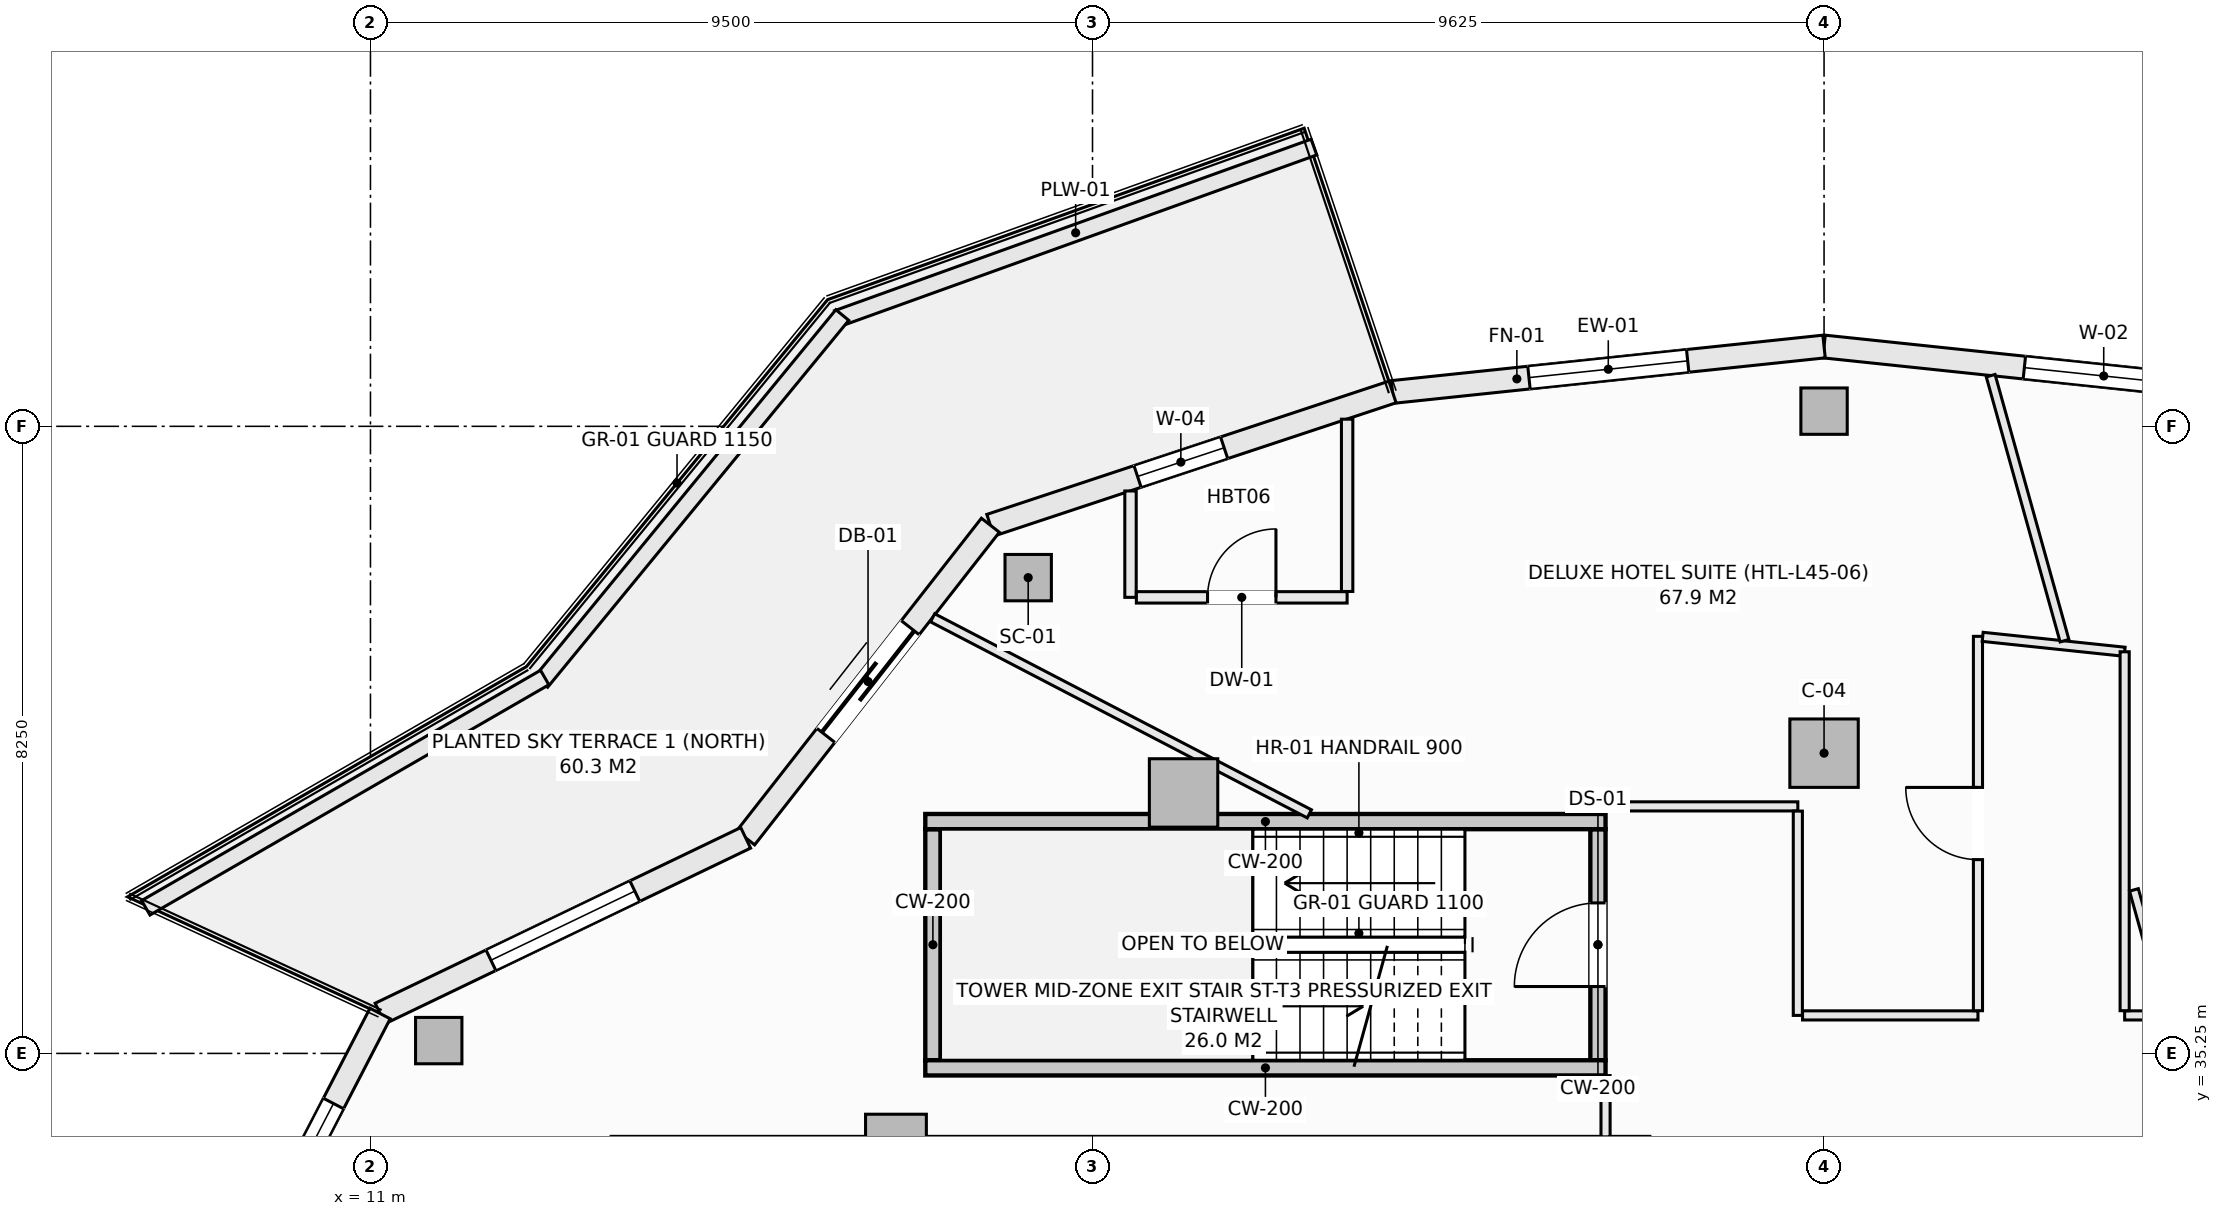
"""IFC4 building model, lengths in metres.
Left out: names, types, materials, properties, quantities, classifications, styles, units other than length and angle.
Written with IfcOpenShell. Run it as: python <this file> out.ifc"""

import sys

from ifc_helpers import new_model, si_unit, direction, frame, frame_2d, origin, origin_2d, place, context, subcontext, project, spatial, rectangle, hollow_rectangle, extrude, element, fill, save


model = new_model("IFC4")
c1 = context("Model", 3, precision=1e-05, world=origin(), true_north=direction((0.0, 1.0)))
c2 = subcontext(c1, "Body", "Model", "MODEL_VIEW")
j1 = project(units=[si_unit("LENGTHUNIT", "METRE"), si_unit("PLANEANGLEUNIT", "RADIAN")], contexts=[c1])
p1 = place(None, origin())
s1 = spatial("IfcSite", under=j1, at=p1, CompositionType="ELEMENT")
p2 = place(p1, origin())
s2 = spatial("IfcBuilding", under=s1, at=p2, CompositionType="ELEMENT")
p3 = place(p2, frame((0.0, 0.0, 173.3)))
s3 = spatial("IfcBuildingStorey", under=s2, at=p3, CompositionType="ELEMENT", Elevation=173.3)
for number, where, z_axis, x_axis in (
    (1, (30.125, 43.7, -0.27), (0.0, 0.0, 1.0), (1.0, 0.0, 0.0)),
    (2, (19.654, 41.51, -0.27), (0.0, 0.0, 1.0), (1.0, 0.0, 0.0)),
    (3, (11.898, 35.419, -0.27), (0.0, 0.0, 1.0), (1.0, 0.0, 0.0)),
):
    element("IfcColumn", number, at=place(p3, frame(where, z_axis=z_axis, x_axis=x_axis)), inside=s3, PredefinedType="COLUMN", context=c2, shape_type="SweptSolid", body=[
        extrude(hollow_rectangle(XDim=0.61, YDim=0.61, WallThickness=0.025, at=origin_2d()), origin(), (0.0, 0.0, 1.0), 3.4),
    ])
for number, where, z_axis, x_axis in (
    (4, (30.125, 39.2, -0.27), (0.0, 0.0, 1.0), (1.0, 0.0, 0.0)),
    (5, (21.698, 38.677, -0.27), (0.0, 0.0, 1.0), (1.0, 0.0, 0.0)),
):
    element("IfcColumn", number, at=place(p3, frame(where, z_axis=z_axis, x_axis=x_axis)), inside=s3, PredefinedType="COLUMN", context=c2, shape_type="SweptSolid", body=[
        extrude(rectangle(XDim=0.9, YDim=0.9, at=origin_2d()), origin(), (0.0, 0.0, 1.0), 3.4),
    ])
p4 = place(p3, frame((17.914, 34.05, -0.27), z_axis=(0.0, 0.0, 1.0), x_axis=(1.0, 0.0, 0.0)))
e6 = element("IfcColumn", 6, at=p4, inside=s3, PredefinedType="PILASTER", context=c2, shape_type="SweptSolid", body=[
    extrude(rectangle(XDim=0.8, YDim=0.8, at=origin_2d()), origin(), (0.0, 0.0, 1.0), 3.4),
])
p5 = place(p3, frame((30.125, 44.55, 0.0), z_axis=(0.0, 0.0, 1.0), x_axis=(0.994496545245, -0.104769372887, 0.0)))
e7 = element("IfcWall", 7, at=p5, inside=s3, PredefinedType="SOLIDWALL", context=c2, shape_type="SweptSolid", body=[
    extrude(rectangle(XDim=5.709, YDim=0.3, at=frame_2d((2.854, 0.0))), origin(), (0.0, 0.0, 1.0), 2.653),
])
p6 = place(p5, frame((2.65, 0.0, 0.74)))
e8 = element("IfcOpeningElement", 8, at=p6, cuts=e7, PredefinedType="OPENING", context=c2, shape_type="SweptSolid", body=[
    extrude(rectangle(XDim=2.1, YDim=1.7, at=frame_2d((1.05, 0.85))), frame((0.0, 0.16, 0.0), z_axis=(0.0, -1.0, 0.0), x_axis=(1.0, 0.0, 0.0)), (0.0, 0.0, 1.0), 0.32),
])
p7 = place(p3, frame((24.447, 43.952, 0.0), z_axis=(0.0, 0.0, 1.0), x_axis=(0.994496545245, 0.104769372887, 0.0)))
e9 = element("IfcWall", 9, at=p7, inside=s3, PredefinedType="SOLIDWALL", context=c2, shape_type="SweptSolid", body=[
    extrude(rectangle(XDim=5.709, YDim=0.3, at=frame_2d((2.854, 0.0))), origin(), (0.0, 0.0, 1.0), 2.653),
])
p8 = place(p7, frame((1.805, 0.0, 0.74)))
e10 = element("IfcOpeningElement", 10, at=p8, cuts=e9, PredefinedType="OPENING", context=c2, shape_type="SweptSolid", body=[
    extrude(rectangle(XDim=2.1, YDim=1.7, at=frame_2d((1.05, 0.85))), frame((0.0, 0.16, 0.0), z_axis=(0.0, -1.0, 0.0), x_axis=(1.0, 0.0, 0.0)), (0.0, 0.0, 1.0), 0.32),
])
p9 = place(p3, frame((19.156, 42.199, 0.0), z_axis=(0.0, 0.0, 1.0), x_axis=(0.949246811547, 0.314532177636, 0.0)))
e11 = element("IfcWall", 11, at=p9, inside=s3, PredefinedType="SOLIDWALL", context=c2, shape_type="SweptSolid", body=[
    extrude(rectangle(XDim=5.574, YDim=0.3, at=frame_2d((2.787, 0.0))), origin(), (0.0, 0.0, 1.0), 2.653),
])
p10 = place(p9, frame((2.04, 0.0, 0.72)))
e12 = element("IfcOpeningElement", 12, at=p10, cuts=e11, PredefinedType="OPENING", context=c2, shape_type="SweptSolid", body=[
    extrude(rectangle(XDim=1.2, YDim=1.65, at=frame_2d((0.6, 0.825))), frame((0.0, 0.16, 0.0), z_axis=(0.0, -1.0, 0.0), x_axis=(1.0, 0.0, 0.0)), (0.0, 0.0, 1.0), 0.32),
])
p11 = place(p3, frame((15.937, 38.086, 0.0), z_axis=(0.0, 0.0, 1.0), x_axis=(0.616429245738, 0.787410302828, 0.0)))
e13 = element("IfcWall", 13, at=p11, inside=s3, PredefinedType="SOLIDWALL", context=c2, shape_type="SweptSolid", body=[
    extrude(rectangle(XDim=5.223, YDim=0.3, at=frame_2d((2.612, 0.0))), origin(), (0.0, 0.0, 1.0), 2.653),
])
p12 = place(p11, frame((1.712, 0.0, 0.0)))
e14 = element("IfcOpeningElement", 14, at=p12, cuts=e13, PredefinedType="OPENING", context=c2, shape_type="SweptSolid", body=[
    extrude(rectangle(XDim=1.8, YDim=2.25, at=frame_2d((0.9, 1.125))), frame((0.0, 0.16, 0.0), z_axis=(0.0, -1.0, 0.0), x_axis=(1.0, 0.0, 0.0)), (0.0, 0.0, 1.0), 0.32),
])
p13 = place(p3, frame((11.127, 35.775, 0.0), z_axis=(0.0, 0.0, 1.0), x_axis=(0.901353070301, 0.433085029363, 0.0)))
e15 = element("IfcWall", 15, at=p13, inside=s3, PredefinedType="SOLIDWALL", context=c2, shape_type="SweptSolid", body=[
    extrude(rectangle(XDim=5.336, YDim=0.3, at=frame_2d((2.668, 0.0))), origin(), (0.0, 0.0, 1.0), 2.653),
])
p14 = place(p13, frame((1.618, 0.0, 0.74)))
e16 = element("IfcOpeningElement", 16, at=p14, cuts=e15, PredefinedType="OPENING", context=c2, shape_type="SweptSolid", body=[
    extrude(rectangle(XDim=2.1, YDim=1.7, at=frame_2d((1.05, 0.85))), frame((0.0, 0.16, 0.0), z_axis=(0.0, -1.0, 0.0), x_axis=(1.0, 0.0, 0.0)), (0.0, 0.0, 1.0), 0.32),
])
p15 = place(p3, frame((8.935, 31.542, 0.0), z_axis=(0.0, 0.0, 1.0), x_axis=(0.459810251451, 0.888017191647, 0.0)))
e17 = element("IfcWall", 17, at=p15, inside=s3, PredefinedType="SOLIDWALL", context=c2, shape_type="SweptSolid", body=[
    extrude(rectangle(XDim=4.766, YDim=0.3, at=frame_2d((2.383, 0.0))), origin(), (0.0, 0.0, 1.0), 2.653),
])
p16 = place(p15, frame((1.333, 0.0, 0.74)))
e18 = element("IfcOpeningElement", 18, at=p16, cuts=e17, PredefinedType="OPENING", context=c2, shape_type="SweptSolid", body=[
    extrude(rectangle(XDim=2.1, YDim=1.7, at=frame_2d((1.05, 0.85))), frame((0.0, 0.16, 0.0), z_axis=(0.0, -1.0, 0.0), x_axis=(1.0, 0.0, 0.0)), (0.0, 0.0, 1.0), 0.32),
])
p17 = place(p3, frame((17.143, 44.918, 0.0), z_axis=(0.0, 0.0, 1.0), x_axis=(0.94094437769, 0.33856118811, 0.0)))
e19 = element("IfcWall", 19, at=p17, inside=s3, PredefinedType="PARAPET", context=c2, shape_type="SweptSolid", body=[
    extrude(rectangle(XDim=6.664, YDim=0.22, at=frame_2d((3.332, 0.0))), origin(), (0.0, 0.0, 1.0), 0.52),
])
p18 = place(p3, frame((13.246, 40.137, 0.0), z_axis=(0.0, 0.0, 1.0), x_axis=(0.634429234628, 0.77298094818, 0.0)))
e20 = element("IfcWall", 20, at=p18, inside=s3, PredefinedType="PARAPET", context=c2, shape_type="SweptSolid", body=[
    extrude(rectangle(XDim=6.245, YDim=0.22, at=frame_2d((3.123, 0.0))), origin(), (0.0, 0.0, 1.0), 0.52),
])
p19 = place(p3, frame((8.044, 37.166, 0.0), z_axis=(0.0, 0.0, 1.0), x_axis=(0.866058128659, 0.499943314571, 0.0)))
e21 = element("IfcWall", 21, at=p19, inside=s3, PredefinedType="PARAPET", context=c2, shape_type="SweptSolid", body=[
    extrude(rectangle(XDim=6.06, YDim=0.22, at=frame_2d((3.03, 0.0))), origin(), (0.0, 0.0, 1.0), 0.52),
])
p20 = place(p3, frame((27.15, 35.16, -0.27), z_axis=(0.0, 0.0, 1.0), x_axis=(0.0, 1.0, 0.0)))
e22 = element("IfcWall", 22, at=p20, inside=s3, PredefinedType="SHEAR", context=c2, shape_type="SweptSolid", body=[
    extrude(rectangle(XDim=3.04, YDim=0.2, at=frame_2d((1.52, 0.0))), origin(), (0.0, 0.0, 1.0), 3.4),
])
p21 = place(p20, frame((0.97, 0.0, 0.27)))
e23 = element("IfcOpeningElement", 23, at=p21, cuts=e22, PredefinedType="OPENING", context=c2, shape_type="SweptSolid", body=[
    extrude(rectangle(XDim=1.1, YDim=2.15, at=frame_2d((0.55, 1.075))), frame((0.0, 0.11, 0.0), z_axis=(0.0, -1.0, 0.0), x_axis=(1.0, 0.0, 0.0)), (0.0, 0.0, 1.0), 0.22),
])
p22 = place(p3, frame((18.4, 35.16, -0.27), z_axis=(0.0, 0.0, 1.0), x_axis=(0.0, 1.0, 0.0)))
e24 = element("IfcWall", 24, at=p22, inside=s3, PredefinedType="SHEAR", context=c2, shape_type="SweptSolid", body=[
    extrude(rectangle(XDim=3.04, YDim=0.2, at=frame_2d((1.52, 0.0))), origin(), (0.0, 0.0, 1.0), 3.4),
])
for number, where, z_axis, x_axis in (
    (25, (18.3, 38.3, -0.27), (0.0, 0.0, 1.0), (1.0, 0.0, 0.0)),
    (26, (18.3, 35.06, -0.27), (0.0, 0.0, 1.0), (1.0, 0.0, 0.0)),
):
    element("IfcWall", number, at=place(p3, frame(where, z_axis=z_axis, x_axis=x_axis)), inside=s3, PredefinedType="SHEAR", context=c2, shape_type="SweptSolid", body=[
        extrude(rectangle(XDim=8.95, YDim=0.2, at=frame_2d((4.475, 0.0))), origin(), (0.0, 0.0, 1.0), 3.4),
    ])
p23 = place(p3, frame((27.25, 34.152, 0.0), z_axis=(0.0, 0.0, 1.0), x_axis=(0.0, 1.0, 0.0)))
e27 = element("IfcWall", 27, at=p23, inside=s3, PredefinedType="PARTITIONING", context=c2, shape_type="SweptSolid", body=[
    extrude(rectangle(XDim=0.806, YDim=0.12, at=frame_2d((0.403, 0.0))), origin(), (0.0, 0.0, 1.0), 3.13),
])
p24 = place(p3, frame((27.25, 38.5, 0.0), z_axis=(0.0, 0.0, 1.0), x_axis=(1.0, 0.0, 0.0)))
e28 = element("IfcWall", 28, at=p24, inside=s3, PredefinedType="PARTITIONING", context=c2, shape_type="SweptSolid", body=[
    extrude(rectangle(XDim=2.53, YDim=0.12, at=frame_2d((1.265, 0.0))), origin(), (0.0, 0.0, 1.0), 3.13),
])
p25 = place(p3, frame((29.78, 35.75, 0.0), z_axis=(0.0, 0.0, 1.0), x_axis=(0.0, 1.0, 0.0)))
e29 = element("IfcWall", 29, at=p25, inside=s3, PredefinedType="PARTITIONING", context=c2, shape_type="SweptSolid", body=[
    extrude(rectangle(XDim=2.688, YDim=0.12, at=frame_2d((1.344, 0.0))), origin(), (0.0, 0.0, 1.0), 3.13),
])
p26 = place(p3, frame((29.842, 35.75, 0.0), z_axis=(0.0, 0.0, 1.0), x_axis=(1.0, 0.0, 0.0)))
e30 = element("IfcWall", 30, at=p26, inside=s3, PredefinedType="PARTITIONING", context=c2, shape_type="SweptSolid", body=[
    extrude(rectangle(XDim=2.308, YDim=0.12, at=frame_2d((1.154, 0.0))), origin(), (0.0, 0.0, 1.0), 3.13),
])
p27 = place(p3, frame((34.08, 35.75, 0.0), z_axis=(0.0, 0.0, 1.0), x_axis=(1.0, 0.0, 0.0)))
e31 = element("IfcWall", 31, at=p27, inside=s3, PredefinedType="PARTITIONING", context=c2, shape_type="SweptSolid", body=[
    extrude(rectangle(XDim=4.878, YDim=0.12, at=frame_2d((2.439, 0.0))), origin(), (0.0, 0.0, 1.0), 2.505),
])
p28 = place(p27, frame((1.485, 0.0, 0.0)))
e32 = element("IfcOpeningElement", 32, at=p28, cuts=e31, PredefinedType="OPENING", context=c2, shape_type="SweptSolid", body=[
    extrude(rectangle(XDim=0.95, YDim=2.1, at=frame_2d((0.475, 1.05))), frame((0.0, 0.07, 0.0), z_axis=(0.0, -1.0, 0.0), x_axis=(1.0, 0.0, 0.0)), (0.0, 0.0, 1.0), 0.14),
])
p29 = place(p3, frame((32.15, 35.812, 0.0), z_axis=(0.0, 0.0, 1.0), x_axis=(0.0, 1.0, 0.0)))
e33 = element("IfcWall", 33, at=p29, inside=s3, PredefinedType="PARTITIONING", context=c2, shape_type="SweptSolid", body=[
    extrude(rectangle(XDim=4.925, YDim=0.12, at=frame_2d((2.462, 0.0))), origin(), (0.0, 0.0, 1.0), 3.13),
])
p30 = place(p29, frame((1.988, 0.0, 0.0)))
e34 = element("IfcOpeningElement", 34, at=p30, cuts=e33, PredefinedType="OPENING", context=c2, shape_type="SweptSolid", body=[
    extrude(rectangle(XDim=0.95, YDim=2.1, at=frame_2d((0.475, 1.05))), frame((0.0, 0.07, 0.0), z_axis=(0.0, -1.0, 0.0), x_axis=(1.0, 0.0, 0.0)), (0.0, 0.0, 1.0), 0.14),
])
p31 = place(p3, frame((32.212, 40.73, 0.0), z_axis=(0.0, 0.0, 1.0), x_axis=(0.994511860417, -0.104623895405, 0.0)))
e35 = element("IfcWall", 35, at=p31, inside=s3, PredefinedType="PARTITIONING", context=c2, shape_type="SweptSolid", body=[
    extrude(rectangle(XDim=1.878, YDim=0.12, at=frame_2d((0.939, 0.0))), origin(), (0.0, 0.0, 1.0), 3.13),
])
p32 = place(p3, frame((34.08, 35.812, 0.0), z_axis=(0.0, 0.0, 1.0), x_axis=(0.0, 1.0, 0.0)))
e36 = element("IfcWall", 36, at=p32, inside=s3, PredefinedType="PARTITIONING", context=c2, shape_type="SweptSolid", body=[
    extrude(rectangle(XDim=4.722, YDim=0.12, at=frame_2d((2.361, 0.0))), origin(), (0.0, 0.0, 1.0), 2.812),
])
p33 = place(p3, frame((18.396, 40.981, 0.0), z_axis=(0.0, 0.0, 1.0), x_axis=(0.887120213162, -0.461538435452, 0.0)))
e37 = element("IfcWall", 37, at=p33, inside=s3, PredefinedType="PARTITIONING", context=c2, shape_type="SweptSolid", body=[
    extrude(rectangle(XDim=5.588, YDim=0.12, at=frame_2d((2.794, 0.0))), origin(), (0.0, 0.0, 1.0), 2.505),
])
p34 = place(p3, frame((32.317, 44.166, 0.0), z_axis=(0.0, 0.0, 1.0), x_axis=(0.268461316047, -0.963290465948, 0.0)))
e38 = element("IfcWall", 38, at=p34, inside=s3, PredefinedType="PARTITIONING", context=c2, shape_type="SweptSolid", body=[
    extrude(rectangle(XDim=3.619, YDim=0.12, at=frame_2d((1.81, 0.0))), origin(), (0.0, 0.0, 1.0), 3.13),
])
p35 = place(p3, frame((34.202, 37.401, 0.0), z_axis=(0.0, 0.0, 1.0), x_axis=(0.268460489063, -0.963290696422, 0.0)))
e39 = element("IfcWall", 39, at=p35, inside=s3, PredefinedType="PARTITIONING", context=c2, shape_type="SweptSolid", body=[
    extrude(rectangle(XDim=1.65, YDim=0.12, at=frame_2d((0.825, 0.0))), origin(), (0.0, 0.0, 1.0), 3.13),
])
p36 = place(p3, frame((21.0, 41.25, 0.0), z_axis=(0.0, 0.0, 1.0), x_axis=(0.0, 1.0, 0.0)))
e40 = element("IfcWall", 40, at=p36, inside=s3, PredefinedType="PARTITIONING", context=c2, shape_type="SweptSolid", body=[
    extrude(rectangle(XDim=1.399, YDim=0.15, at=frame_2d((0.7, 0.0))), origin(), (0.0, 0.0, 1.0), 3.13),
])
p37 = place(p3, frame((21.077, 41.25, 0.0), z_axis=(0.0, 0.0, 1.0), x_axis=(1.0, 0.0, 0.0)))
e41 = element("IfcWall", 41, at=p37, inside=s3, PredefinedType="PARTITIONING", context=c2, shape_type="SweptSolid", body=[
    extrude(rectangle(XDim=2.773, YDim=0.15, at=frame_2d((1.387, 0.0))), origin(), (0.0, 0.0, 1.0), 3.13),
])
p38 = place(p37, frame((0.937, 0.0, 0.0)))
e42 = element("IfcOpeningElement", 42, at=p38, cuts=e41, PredefinedType="OPENING", context=c2, shape_type="SweptSolid", body=[
    extrude(rectangle(XDim=0.9, YDim=2.1, at=frame_2d((0.45, 1.05))), frame((0.0, 0.085, 0.0), z_axis=(0.0, -1.0, 0.0), x_axis=(1.0, 0.0, 0.0)), (0.0, 0.0, 1.0), 0.17),
])
p39 = place(p3, frame((23.85, 41.327, 0.0), z_axis=(0.0, 0.0, 1.0), x_axis=(0.0, 1.0, 0.0)))
e43 = element("IfcWall", 43, at=p39, inside=s3, PredefinedType="PARTITIONING", context=c2, shape_type="SweptSolid", body=[
    extrude(rectangle(XDim=2.267, YDim=0.15, at=frame_2d((1.134, 0.0))), origin(), (0.0, 0.0, 1.0), 3.13),
])
p40 = place(p6, origin())
e44 = element("IfcWindow", 44, at=p40, inside=s3, PartitioningType="SINGLE_PANEL", PredefinedType="WINDOW", context=c2, shape_type="SweptSolid", body=[
    extrude(rectangle(XDim=2.1, YDim=1.7, at=frame_2d((1.05, 0.85))), frame((0.0, 0.03, 0.0), z_axis=(0.0, -1.0, 0.0), x_axis=(1.0, 0.0, 0.0)), (0.0, 0.0, 1.0), 0.06),
])
fill(e8, e44)
p41 = place(p8, origin())
e45 = element("IfcWindow", 45, at=p41, inside=s3, PartitioningType="SINGLE_PANEL", PredefinedType="WINDOW", context=c2, shape_type="SweptSolid", body=[
    extrude(rectangle(XDim=2.1, YDim=1.7, at=frame_2d((1.05, 0.85))), frame((0.0, 0.03, 0.0), z_axis=(0.0, -1.0, 0.0), x_axis=(1.0, 0.0, 0.0)), (0.0, 0.0, 1.0), 0.06),
])
fill(e10, e45)
p42 = place(p10, origin())
e46 = element("IfcWindow", 46, at=p42, inside=s3, PartitioningType="SINGLE_PANEL", PredefinedType="WINDOW", context=c2, shape_type="SweptSolid", body=[
    extrude(rectangle(XDim=1.2, YDim=1.65, at=frame_2d((0.6, 0.825))), frame((0.0, 0.03, 0.0), z_axis=(0.0, -1.0, 0.0), x_axis=(1.0, 0.0, 0.0)), (0.0, 0.0, 1.0), 0.06),
])
fill(e12, e46)
p43 = place(p12, origin())
e47 = element("IfcDoor", 47, at=p43, inside=s3, OperationType="SLIDING_TO_LEFT", PredefinedType="DOOR", context=c2, shape_type="SweptSolid", body=[
    extrude(rectangle(XDim=1.8, YDim=2.25, at=frame_2d((0.9, 1.125))), frame((0.0, 0.025, 0.0), z_axis=(0.0, -1.0, 0.0), x_axis=(1.0, 0.0, 0.0)), (0.0, 0.0, 1.0), 0.05),
])
fill(e14, e47)
p44 = place(p14, origin())
e48 = element("IfcWindow", 48, at=p44, inside=s3, PartitioningType="SINGLE_PANEL", PredefinedType="WINDOW", context=c2, shape_type="SweptSolid", body=[
    extrude(rectangle(XDim=2.1, YDim=1.7, at=frame_2d((1.05, 0.85))), frame((0.0, 0.03, 0.0), z_axis=(0.0, -1.0, 0.0), x_axis=(1.0, 0.0, 0.0)), (0.0, 0.0, 1.0), 0.06),
])
fill(e16, e48)
p45 = place(p16, origin())
e49 = element("IfcWindow", 49, at=p45, inside=s3, PartitioningType="SINGLE_PANEL", PredefinedType="WINDOW", context=c2, shape_type="SweptSolid", body=[
    extrude(rectangle(XDim=2.1, YDim=1.7, at=frame_2d((1.05, 0.85))), frame((0.0, 0.03, 0.0), z_axis=(0.0, -1.0, 0.0), x_axis=(1.0, 0.0, 0.0)), (0.0, 0.0, 1.0), 0.06),
])
fill(e18, e49)
p46 = place(p21, origin())
e50 = element("IfcDoor", 50, at=p46, inside=s3, OperationType="SINGLE_SWING_LEFT", PredefinedType="DOOR", context=c2, shape_type="SweptSolid", body=[
    extrude(rectangle(XDim=1.1, YDim=2.15, at=frame_2d((0.55, 1.075))), frame((0.0, 0.025, 0.0), z_axis=(0.0, -1.0, 0.0), x_axis=(1.0, 0.0, 0.0)), (0.0, 0.0, 1.0), 0.05),
])
fill(e23, e50)
p47 = place(p30, origin())
e51 = element("IfcDoor", 51, at=p47, inside=s3, OperationType="SINGLE_SWING_RIGHT", PredefinedType="DOOR", context=c2, shape_type="SweptSolid", body=[
    extrude(rectangle(XDim=0.95, YDim=2.1, at=frame_2d((0.475, 1.05))), frame((0.0, 0.025, 0.0), z_axis=(0.0, -1.0, 0.0), x_axis=(1.0, 0.0, 0.0)), (0.0, 0.0, 1.0), 0.05),
])
fill(e34, e51)
p48 = place(p38, origin())
e52 = element("IfcDoor", 52, at=p48, inside=s3, OperationType="SINGLE_SWING_RIGHT", PredefinedType="DOOR", context=c2, shape_type="SweptSolid", body=[
    extrude(rectangle(XDim=0.9, YDim=2.1, at=frame_2d((0.45, 1.05))), frame((0.0, 0.025, 0.0), z_axis=(0.0, -1.0, 0.0), x_axis=(1.0, 0.0, 0.0)), (0.0, 0.0, 1.0), 0.05),
])
fill(e42, e52)
save(model, sys.argv[1])
